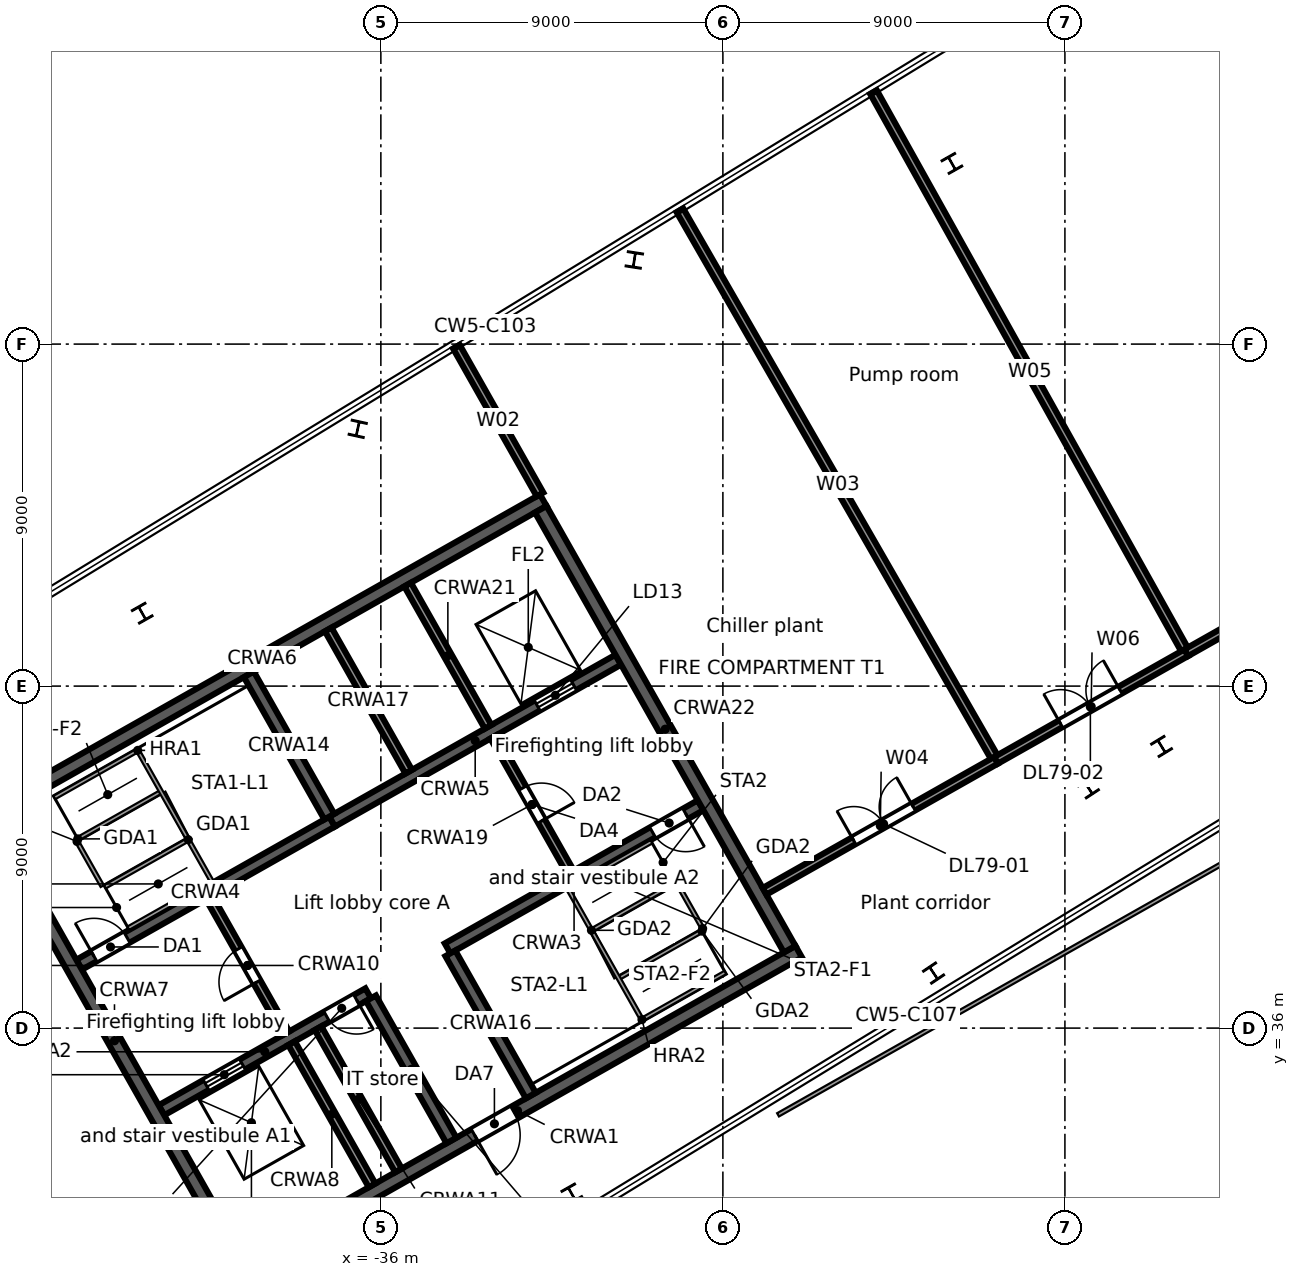
"""IFC4 building model, lengths in metres.
Left out: names, types, materials, properties, quantities, classifications, styles, units other than length and angle.
Written with IfcOpenShell. Run it as: python <this file> out.ifc"""

import sys

from ifc_helpers import new_model, si_unit, direction, frame, frame_2d, origin, origin_2d, place, context, subcontext, project, spatial, rectangle, i_section, extrude, element, fill, save


model = new_model("IFC4")
c1 = context("Model", 3, precision=1e-05, world=origin(), true_north=direction((0.0, 1.0)))
c2 = subcontext(c1, "Body", "Model", "MODEL_VIEW")
j1 = project(units=[si_unit("LENGTHUNIT", "METRE"), si_unit("PLANEANGLEUNIT", "RADIAN")], contexts=[c1])
p1 = place(None, origin())
s1 = spatial("IfcSite", under=j1, at=p1, CompositionType="ELEMENT")
p2 = place(p1, origin())
s2 = spatial("IfcBuilding", under=s1, at=p2, CompositionType="ELEMENT")
p3 = place(p2, frame((0.0, 0.0, 346.9)))
s3 = spatial("IfcBuildingStorey", under=s2, at=p3, CompositionType="ELEMENT", Elevation=346.9)
for number, where, z_axis, x_axis in (
    (1, (-42.28, 46.919, 0.0), (0.0, 0.0, 1.0), (-0.87, -0.492, 0.0)),
    (2, (-30.976, 31.635, 0.0), (0.0, 0.0, 1.0), (0.87, 0.492, 0.0)),
):
    element("IfcColumn", number, at=place(p3, frame(where, z_axis=z_axis, x_axis=x_axis)), inside=s3, PredefinedType="COLUMN", context=c2, shape_type="SweptSolid", body=[
        extrude(i_section(OverallWidth=0.4, OverallDepth=0.4, WebThickness=0.013, FlangeThickness=0.021, FilletRadius=0.022, at=origin_2d()), origin(), (0.0, 0.0, 1.0), 3.6),
    ])
for number, where, z_axis, x_axis in (
    (3, (-20.974, 58.755, -0.3), (0.0, 0.0, 1.0), (-0.87, -0.492, 0.0)),
    (4, (-29.331, 56.214, -0.3), (0.0, 0.0, 1.0), (-0.988, 0.153, 0.0)),
    (5, (-36.609, 51.77, -0.3), (0.0, 0.0, 1.0), (-0.977, 0.215, 0.0)),
    (6, (-21.456, 37.448, -0.3), (0.0, 0.0, 1.0), (0.83, 0.557, 0.0)),
    (7, (-15.458, 43.413, -0.3), (0.0, 0.0, 1.0), (0.853, 0.521, 0.0)),
    (8, (-17.382, 42.324, -0.3), (0.0, 0.0, 1.0), (0.836, 0.549, 0.0)),
):
    element("IfcColumn", number, at=place(p3, frame(where, z_axis=z_axis, x_axis=x_axis)), inside=s3, PredefinedType="COLUMN", context=c2, shape_type="SweptSolid", body=[
        extrude(i_section(OverallWidth=0.4, OverallDepth=0.4, WebThickness=0.013, FlangeThickness=0.021, FilletRadius=0.022, at=origin_2d()), origin(), (0.0, 0.0, 1.0), 3.9),
    ])
p4 = place(p3, frame((-44.12, 26.51, 0.0), z_axis=(0.0, 0.0, 1.0), x_axis=(-0.85716996621, 0.515033638734, 0.0)))
e9 = element("IfcWall", 9, at=p4, inside=s3, PredefinedType="STANDARD", context=c2, shape_type="SweptSolid", body=[
    extrude(rectangle(XDim=17.084, YDim=0.2, at=frame_2d((8.542, 0.0))), origin(), (0.0, 0.0, 1.0), 3.3),
])
p5 = place(p3, frame((-39.801, 29.64, 0.0), z_axis=(0.0, 0.0, 1.0), x_axis=(0.870359753402, 0.492416388494, 0.0)))
e10 = element("IfcWall", 10, at=p5, inside=s3, PredefinedType="SOLIDWALL", context=c2, shape_type="SweptSolid", body=[
    extrude(rectangle(XDim=17.0, YDim=0.35, at=frame_2d((8.5, 0.0))), origin(), (0.0, 0.0, 1.0), 3.3),
])
p6 = place(p5, frame((7.2, 0.0, 0.0)))
e11 = element("IfcOpeningElement", 11, at=p6, cuts=e10, PredefinedType="OPENING", context=c2, shape_type="SweptSolid", body=[
    extrude(rectangle(XDim=1.2, YDim=2.1, at=frame_2d((0.6, 1.05))), frame((0.0, 0.185, 0.0), z_axis=(0.0, -1.0, 0.0), x_axis=(1.0, 0.0, 0.0)), (0.0, 0.0, 1.0), 0.37),
])
p7 = place(p3, frame((-41.774, 33.838, 0.0), z_axis=(0.0, 0.0, 1.0), x_axis=(0.870355415866, 0.492424055132, 0.0)))
e12 = element("IfcWall", 12, at=p7, inside=s3, PredefinedType="SOLIDWALL", context=c2, shape_type="SweptSolid", body=[
    extrude(rectangle(XDim=6.25, YDim=0.3, at=frame_2d((3.125, 0.0))), origin(), (0.0, 0.0, 1.0), 3.3),
])
p8 = place(p7, frame((1.35, 0.0, 0.0)))
e13 = element("IfcOpeningElement", 13, at=p8, cuts=e12, PredefinedType="OPENING", context=c2, shape_type="SweptSolid", body=[
    extrude(rectangle(XDim=1.1, YDim=2.1, at=frame_2d((0.55, 1.05))), frame((0.0, 0.16, 0.0), z_axis=(0.0, -1.0, 0.0), x_axis=(1.0, 0.0, 0.0)), (0.0, 0.0, 1.0), 0.32),
])
p9 = place(p7, frame((5.0, 0.0, 0.0)))
e14 = element("IfcOpeningElement", 14, at=p9, cuts=e12, PredefinedType="OPENING", context=c2, shape_type="SweptSolid", body=[
    extrude(rectangle(XDim=0.9, YDim=2.1, at=frame_2d((0.45, 1.05))), frame((0.0, 0.16, 0.0), z_axis=(0.0, -1.0, 0.0), x_axis=(1.0, 0.0, 0.0)), (0.0, 0.0, 1.0), 0.32),
])
p10 = place(p3, frame((-34.245, 38.097, 0.0), z_axis=(0.0, 0.0, 1.0), x_axis=(0.870352347706, 0.49242947804, 0.0)))
e15 = element("IfcWall", 15, at=p10, inside=s3, PredefinedType="SOLIDWALL", context=c2, shape_type="SweptSolid", body=[
    extrude(rectangle(XDim=7.65, YDim=0.3, at=frame_2d((3.825, 0.0))), origin(), (0.0, 0.0, 1.0), 3.3),
])
p11 = place(p10, frame((6.2, 0.0, 0.0)))
e16 = element("IfcOpeningElement", 16, at=p11, cuts=e15, PredefinedType="OPENING", context=c2, shape_type="SweptSolid", body=[
    extrude(rectangle(XDim=1.0, YDim=2.1, at=frame_2d((0.5, 1.05))), frame((0.0, 0.16, 0.0), z_axis=(0.0, -1.0, 0.0), x_axis=(1.0, 0.0, 0.0)), (0.0, 0.0, 1.0), 0.32),
])
p12 = place(p3, frame((-43.94, 37.667, 0.0), z_axis=(0.0, 0.0, 1.0), x_axis=(0.870352347706, 0.49242947804, 0.0)))
e17 = element("IfcWall", 17, at=p12, inside=s3, PredefinedType="SOLIDWALL", context=c2, shape_type="SweptSolid", body=[
    extrude(rectangle(XDim=7.65, YDim=0.3, at=frame_2d((3.825, 0.0))), origin(), (0.0, 0.0, 1.0), 3.3),
])
p13 = place(p12, frame((0.45, 0.0, 0.0)))
e18 = element("IfcOpeningElement", 18, at=p13, cuts=e17, PredefinedType="OPENING", context=c2, shape_type="SweptSolid", body=[
    extrude(rectangle(XDim=1.0, YDim=2.1, at=frame_2d((0.5, 1.05))), frame((0.0, 0.16, 0.0), z_axis=(0.0, -1.0, 0.0), x_axis=(1.0, 0.0, 0.0)), (0.0, 0.0, 1.0), 0.32),
])
p14 = place(p3, frame((-37.282, 41.435, 0.0), z_axis=(0.0, 0.0, 1.0), x_axis=(0.870364588774, 0.492407841741, 0.0)))
e19 = element("IfcWall", 19, at=p14, inside=s3, PredefinedType="SOLIDWALL", context=c2, shape_type="SweptSolid", body=[
    extrude(rectangle(XDim=8.65, YDim=0.3, at=frame_2d((4.325, 0.0))), origin(), (0.0, 0.0, 1.0), 3.3),
])
p15 = place(p14, frame((6.2, 0.0, 0.0)))
e20 = element("IfcOpeningElement", 20, at=p15, cuts=e19, PredefinedType="OPENING", context=c2, shape_type="SweptSolid", body=[
    extrude(rectangle(XDim=1.1, YDim=2.1, at=frame_2d((0.55, 1.05))), frame((0.0, 0.16, 0.0), z_axis=(0.0, -1.0, 0.0), x_axis=(1.0, 0.0, 0.0)), (0.0, 0.0, 1.0), 0.32),
])
p16 = place(p3, frame((-46.522, 41.521, 0.0), z_axis=(0.0, 0.0, 1.0), x_axis=(0.870359753402, 0.492416388494, 0.0)))
e21 = element("IfcWall", 21, at=p16, inside=s3, PredefinedType="SOLIDWALL", context=c2, shape_type="SweptSolid", body=[
    extrude(rectangle(XDim=17.0, YDim=0.35, at=frame_2d((8.5, 0.0))), origin(), (0.0, 0.0, 1.0), 3.3),
])
p17 = place(p3, frame((-46.284, 41.454, 0.0), z_axis=(0.0, 0.0, 1.0), x_axis=(0.492429810477, -0.870352159619, 0.0)))
e22 = element("IfcWall", 22, at=p17, inside=s3, PredefinedType="SOLIDWALL", context=c2, shape_type="SweptSolid", body=[
    extrude(rectangle(XDim=13.3, YDim=0.35, at=frame_2d((6.65, 0.0))), origin(), (0.0, 0.0, 1.0), 3.3),
])
p18 = place(p3, frame((-38.349, 35.603, 0.0), z_axis=(0.0, 0.0, 1.0), x_axis=(0.492410799949, -0.870362915164, 0.0)))
e23 = element("IfcWall", 23, at=p18, inside=s3, PredefinedType="SOLIDWALL", context=c2, shape_type="SweptSolid", body=[
    extrude(rectangle(XDim=4.3, YDim=0.2, at=frame_2d((2.15, 0.0))), origin(), (0.0, 0.0, 1.0), 3.3),
])
p19 = place(p3, frame((-40.516, 39.433, 0.0), z_axis=(0.0, 0.0, 1.0), x_axis=(0.492453559952, -0.87033872216, 0.0)))
e24 = element("IfcWall", 24, at=p19, inside=s3, PredefinedType="PARTITIONING", context=c2, shape_type="SweptSolid", body=[
    extrude(rectangle(XDim=4.1, YDim=0.2, at=frame_2d((2.05, 0.0))), origin(), (0.0, 0.0, 1.0), 3.3),
])
p20 = place(p19, frame((1.55, 0.0, 0.0)))
e25 = element("IfcOpeningElement", 25, at=p20, cuts=e24, PredefinedType="OPENING", context=c2, shape_type="SweptSolid", body=[
    extrude(rectangle(XDim=1.0, YDim=2.1, at=frame_2d((0.5, 1.05))), frame((0.0, 0.11, 0.0), z_axis=(0.0, -1.0, 0.0), x_axis=(1.0, 0.0, 0.0)), (0.0, 0.0, 1.0), 0.22),
])
p21 = place(p3, frame((-37.653, 35.997, 0.0), z_axis=(0.0, 0.0, 1.0), x_axis=(0.492435133428, -0.870349147967, 0.0)))
e26 = element("IfcWall", 26, at=p21, inside=s3, PredefinedType="SOLIDWALL", context=c2, shape_type="SweptSolid", body=[
    extrude(rectangle(XDim=4.3, YDim=0.2, at=frame_2d((2.15, 0.0))), origin(), (0.0, 0.0, 1.0), 3.3),
])
p22 = place(p3, frame((-36.26, 36.785, 0.0), z_axis=(0.0, 0.0, 1.0), x_axis=(0.492435133428, -0.870349147967, 0.0)))
e27 = element("IfcWall", 27, at=p22, inside=s3, PredefinedType="SOLIDWALL", context=c2, shape_type="SweptSolid", body=[
    extrude(rectangle(XDim=4.3, YDim=0.3, at=frame_2d((2.15, 0.0))), origin(), (0.0, 0.0, 1.0), 3.3),
])
p23 = place(p3, frame((-39.473, 45.308, 0.0), z_axis=(0.0, 0.0, 1.0), x_axis=(0.492410799949, -0.870362915164, 0.0)))
e28 = element("IfcWall", 28, at=p23, inside=s3, PredefinedType="SOLIDWALL", context=c2, shape_type="SweptSolid", body=[
    extrude(rectangle(XDim=4.3, YDim=0.3, at=frame_2d((2.15, 0.0))), origin(), (0.0, 0.0, 1.0), 3.3),
])
p24 = place(p3, frame((-34.171, 37.967, 0.0), z_axis=(0.0, 0.0, 1.0), x_axis=(0.492435133428, -0.870349147967, 0.0)))
e29 = element("IfcWall", 29, at=p24, inside=s3, PredefinedType="SOLIDWALL", context=c2, shape_type="SweptSolid", body=[
    extrude(rectangle(XDim=4.3, YDim=0.3, at=frame_2d((2.15, 0.0))), origin(), (0.0, 0.0, 1.0), 3.3),
])
p25 = place(p3, frame((-37.385, 46.49, 0.0), z_axis=(0.0, 0.0, 1.0), x_axis=(0.492410799949, -0.870362915164, 0.0)))
e30 = element("IfcWall", 30, at=p25, inside=s3, PredefinedType="SOLIDWALL", context=c2, shape_type="SweptSolid", body=[
    extrude(rectangle(XDim=4.3, YDim=0.2, at=frame_2d((2.15, 0.0))), origin(), (0.0, 0.0, 1.0), 3.3),
])
p26 = place(p3, frame((-33.031, 43.667, 0.0), z_axis=(0.0, 0.0, 1.0), x_axis=(0.492408451753, -0.87036424366, 0.0)))
e31 = element("IfcWall", 31, at=p26, inside=s3, PredefinedType="PARTITIONING", context=c2, shape_type="SweptSolid", body=[
    extrude(rectangle(XDim=4.1, YDim=0.2, at=frame_2d((2.05, 0.0))), origin(), (0.0, 0.0, 1.0), 3.3),
])
p27 = place(p26, frame((1.55, 0.0, 0.0)))
e32 = element("IfcOpeningElement", 32, at=p27, cuts=e31, PredefinedType="OPENING", context=c2, shape_type="SweptSolid", body=[
    extrude(rectangle(XDim=1.0, YDim=2.1, at=frame_2d((0.5, 1.05))), frame((0.0, 0.11, 0.0), z_axis=(0.0, -1.0, 0.0), x_axis=(1.0, 0.0, 0.0)), (0.0, 0.0, 1.0), 0.22),
])
p28 = place(p3, frame((-35.296, 47.671, 0.0), z_axis=(0.0, 0.0, 1.0), x_axis=(0.492435133428, -0.870349147967, 0.0)))
e33 = element("IfcWall", 33, at=p28, inside=s3, PredefinedType="SOLIDWALL", context=c2, shape_type="SweptSolid", body=[
    extrude(rectangle(XDim=4.3, YDim=0.2, at=frame_2d((2.15, 0.0))), origin(), (0.0, 0.0, 1.0), 3.3),
])
p29 = place(p3, frame((-31.792, 49.653, 0.0), z_axis=(0.0, 0.0, 1.0), x_axis=(0.492421943245, -0.870356610712, 0.0)))
e34 = element("IfcWall", 34, at=p29, inside=s3, PredefinedType="SOLIDWALL", context=c2, shape_type="SweptSolid", body=[
    extrude(rectangle(XDim=13.3, YDim=0.35, at=frame_2d((6.65, 0.0))), origin(), (0.0, 0.0, 1.0), 3.3),
])
p30 = place(p3, frame((-34.012, 53.93, 0.0), z_axis=(0.0, 0.0, 1.0), x_axis=(0.49265524993, -0.870224571428, 0.0)))
e35 = element("IfcWall", 35, at=p30, inside=s3, PredefinedType="PARTITIONING", context=c2, shape_type="SweptSolid", body=[
    extrude(rectangle(XDim=4.466, YDim=0.2, at=frame_2d((2.233, 0.0))), origin(), (0.0, 0.0, 1.0), 2.68),
])
p31 = place(p3, frame((-28.131, 57.521, 0.0), z_axis=(0.0, 0.0, 1.0), x_axis=(0.498362592797, -0.866968699609, 0.0)))
e36 = element("IfcWall", 36, at=p31, inside=s3, PredefinedType="PARTITIONING", context=c2, shape_type="SweptSolid", body=[
    extrude(rectangle(XDim=16.695, YDim=0.2, at=frame_2d((8.347, 0.0))), origin(), (0.0, 0.0, 1.0), 2.68),
])
p32 = place(p3, frame((-25.904, 39.6, 0.0), z_axis=(0.0, 0.0, 1.0), x_axis=(0.870370511163, 0.492397373366, 0.0)))
e37 = element("IfcWall", 37, at=p32, inside=s3, PredefinedType="PARTITIONING", context=c2, shape_type="SweptSolid", body=[
    extrude(rectangle(XDim=7.0, YDim=0.2, at=frame_2d((3.5, 0.0))), origin(), (0.0, 0.0, 1.0), 3.3),
])
p33 = place(p32, frame((2.7, 0.0, 0.0)))
e38 = element("IfcOpeningElement", 38, at=p33, cuts=e37, PredefinedType="OPENING", context=c2, shape_type="SweptSolid", body=[
    extrude(rectangle(XDim=1.8, YDim=2.1, at=frame_2d((0.9, 1.05))), frame((0.0, 0.11, 0.0), z_axis=(0.0, -1.0, 0.0), x_axis=(1.0, 0.0, 0.0)), (0.0, 0.0, 1.0), 0.22),
])
p34 = place(p3, frame((-23.037, 60.631, 0.0), z_axis=(0.0, 0.0, 1.0), x_axis=(0.487224959402, -0.873276496269, 0.0)))
e39 = element("IfcWall", 39, at=p34, inside=s3, PredefinedType="PARTITIONING", context=c2, shape_type="SweptSolid", body=[
    extrude(rectangle(XDim=16.894, YDim=0.2, at=frame_2d((8.447, 0.0))), origin(), (0.0, 0.0, 1.0), 2.68),
])
p35 = place(p3, frame((-19.811, 43.047, 0.0), z_axis=(0.0, 0.0, 1.0), x_axis=(0.870426794604, 0.492297872467, 0.0)))
e40 = element("IfcWall", 40, at=p35, inside=s3, PredefinedType="PARTITIONING", context=c2, shape_type="SweptSolid", body=[
    extrude(rectangle(XDim=5.75, YDim=0.2, at=frame_2d((2.875, 0.0))), origin(), (0.0, 0.0, 1.0), 3.3),
])
p36 = place(p35, frame((1.95, 0.0, 0.0)))
e41 = element("IfcOpeningElement", 41, at=p36, cuts=e40, PredefinedType="OPENING", context=c2, shape_type="SweptSolid", body=[
    extrude(rectangle(XDim=1.8, YDim=2.1, at=frame_2d((0.9, 1.05))), frame((0.0, 0.11, 0.0), z_axis=(0.0, -1.0, 0.0), x_axis=(1.0, 0.0, 0.0)), (0.0, 0.0, 1.0), 0.22),
])
p37 = place(p3, frame((-14.806, 45.878, 0.0), z_axis=(0.0, 0.0, 1.0), x_axis=(0.870379652776, 0.492381214136, 0.0)))
e42 = element("IfcWall", 42, at=p37, inside=s3, PredefinedType="PARTITIONING", context=c2, shape_type="SweptSolid", body=[
    extrude(rectangle(XDim=12.862, YDim=0.2, at=frame_2d((6.431, 0.0))), origin(), (0.0, 0.0, 1.0), 2.68),
])
p38 = place(p37, frame((5.45, 0.0, 0.0)))
e43 = element("IfcOpeningElement", 43, at=p38, cuts=e42, PredefinedType="OPENING", context=c2, shape_type="SweptSolid", body=[
    extrude(rectangle(XDim=1.8, YDim=2.1, at=frame_2d((0.9, 1.05))), frame((0.0, 0.11, 0.0), z_axis=(0.0, -1.0, 0.0), x_axis=(1.0, 0.0, 0.0)), (0.0, 0.0, 1.0), 0.22),
])
p39 = place(p15, origin())
e44 = element("IfcDoor", 44, at=p39, inside=s3, OperationType="DOUBLE_DOOR_SLIDING", PredefinedType="DOOR", context=c2, shape_type="SweptSolid", body=[
    extrude(rectangle(XDim=1.1, YDim=2.1, at=frame_2d((0.55, 1.05))), frame((0.0, 0.025, 0.0), z_axis=(0.0, -1.0, 0.0), x_axis=(1.0, 0.0, 0.0)), (0.0, 0.0, 1.0), 0.05),
])
fill(e20, e44)
p40 = place(p8, origin())
e45 = element("IfcDoor", 45, at=p40, inside=s3, OperationType="DOUBLE_DOOR_SLIDING", PredefinedType="DOOR", context=c2, shape_type="SweptSolid", body=[
    extrude(rectangle(XDim=1.1, YDim=2.1, at=frame_2d((0.55, 1.05))), frame((0.0, 0.025, 0.0), z_axis=(0.0, -1.0, 0.0), x_axis=(1.0, 0.0, 0.0)), (0.0, 0.0, 1.0), 0.05),
])
fill(e13, e45)
p41 = place(p13, origin())
e46 = element("IfcDoor", 46, at=p41, inside=s3, OperationType="SINGLE_SWING_LEFT", PredefinedType="DOOR", context=c2, shape_type="SweptSolid", body=[
    extrude(rectangle(XDim=1.0, YDim=2.1, at=frame_2d((0.5, 1.05))), frame((0.0, 0.025, 0.0), z_axis=(0.0, -1.0, 0.0), x_axis=(1.0, 0.0, 0.0)), (0.0, 0.0, 1.0), 0.05),
])
fill(e18, e46)
p42 = place(p11, frame((1.0, 0.0, 0.0), z_axis=(0.0, 0.0, 1.0), x_axis=(-1.0, 0.0, 0.0)))
e47 = element("IfcDoor", 47, at=p42, inside=s3, OperationType="SINGLE_SWING_LEFT", PredefinedType="DOOR", context=c2, shape_type="SweptSolid", body=[
    extrude(rectangle(XDim=1.0, YDim=2.1, at=frame_2d((0.5, 1.05))), frame((0.0, 0.025, 0.0), z_axis=(0.0, -1.0, 0.0), x_axis=(1.0, 0.0, 0.0)), (0.0, 0.0, 1.0), 0.05),
])
fill(e16, e47)
p43 = place(p20, frame((1.0, 0.0, 0.0), z_axis=(0.0, 0.0, 1.0), x_axis=(-1.0, 0.0, 0.0)))
e48 = element("IfcDoor", 48, at=p43, inside=s3, OperationType="SINGLE_SWING_LEFT", PredefinedType="DOOR", context=c2, shape_type="SweptSolid", body=[
    extrude(rectangle(XDim=1.0, YDim=2.1, at=frame_2d((0.5, 1.05))), frame((0.0, 0.025, 0.0), z_axis=(0.0, -1.0, 0.0), x_axis=(1.0, 0.0, 0.0)), (0.0, 0.0, 1.0), 0.05),
])
fill(e25, e48)
p44 = place(p27, origin())
e49 = element("IfcDoor", 49, at=p44, inside=s3, OperationType="SINGLE_SWING_RIGHT", PredefinedType="DOOR", context=c2, shape_type="SweptSolid", body=[
    extrude(rectangle(XDim=1.0, YDim=2.1, at=frame_2d((0.5, 1.05))), frame((0.0, 0.025, 0.0), z_axis=(0.0, -1.0, 0.0), x_axis=(1.0, 0.0, 0.0)), (0.0, 0.0, 1.0), 0.05),
])
fill(e32, e49)
p45 = place(p6, frame((1.2, 0.0, 0.0), z_axis=(0.0, 0.0, 1.0), x_axis=(-1.0, 0.0, 0.0)))
e50 = element("IfcDoor", 50, at=p45, inside=s3, OperationType="SINGLE_SWING_RIGHT", PredefinedType="DOOR", context=c2, shape_type="SweptSolid", body=[
    extrude(rectangle(XDim=1.2, YDim=2.1, at=frame_2d((0.6, 1.05))), frame((0.0, 0.025, 0.0), z_axis=(0.0, -1.0, 0.0), x_axis=(1.0, 0.0, 0.0)), (0.0, 0.0, 1.0), 0.05),
])
fill(e11, e50)
p46 = place(p9, frame((0.9, 0.0, 0.0), z_axis=(0.0, 0.0, 1.0), x_axis=(-1.0, 0.0, 0.0)))
e51 = element("IfcDoor", 51, at=p46, inside=s3, OperationType="SINGLE_SWING_LEFT", PredefinedType="DOOR", context=c2, shape_type="SweptSolid", body=[
    extrude(rectangle(XDim=0.9, YDim=2.1, at=frame_2d((0.45, 1.05))), frame((0.0, 0.025, 0.0), z_axis=(0.0, -1.0, 0.0), x_axis=(1.0, 0.0, 0.0)), (0.0, 0.0, 1.0), 0.05),
])
fill(e14, e51)
p47 = place(p33, origin())
e52 = element("IfcDoor", 52, at=p47, inside=s3, OperationType="DOUBLE_DOOR_SINGLE_SWING", PredefinedType="DOOR", context=c2, shape_type="SweptSolid", body=[
    extrude(rectangle(XDim=1.8, YDim=2.1, at=frame_2d((0.9, 1.05))), frame((0.0, 0.025, 0.0), z_axis=(0.0, -1.0, 0.0), x_axis=(1.0, 0.0, 0.0)), (0.0, 0.0, 1.0), 0.05),
])
fill(e38, e52)
p48 = place(p36, origin())
e53 = element("IfcDoor", 53, at=p48, inside=s3, OperationType="DOUBLE_DOOR_SINGLE_SWING", PredefinedType="DOOR", context=c2, shape_type="SweptSolid", body=[
    extrude(rectangle(XDim=1.8, YDim=2.1, at=frame_2d((0.9, 1.05))), frame((0.0, 0.025, 0.0), z_axis=(0.0, -1.0, 0.0), x_axis=(1.0, 0.0, 0.0)), (0.0, 0.0, 1.0), 0.05),
])
fill(e41, e53)
save(model, sys.argv[1])
